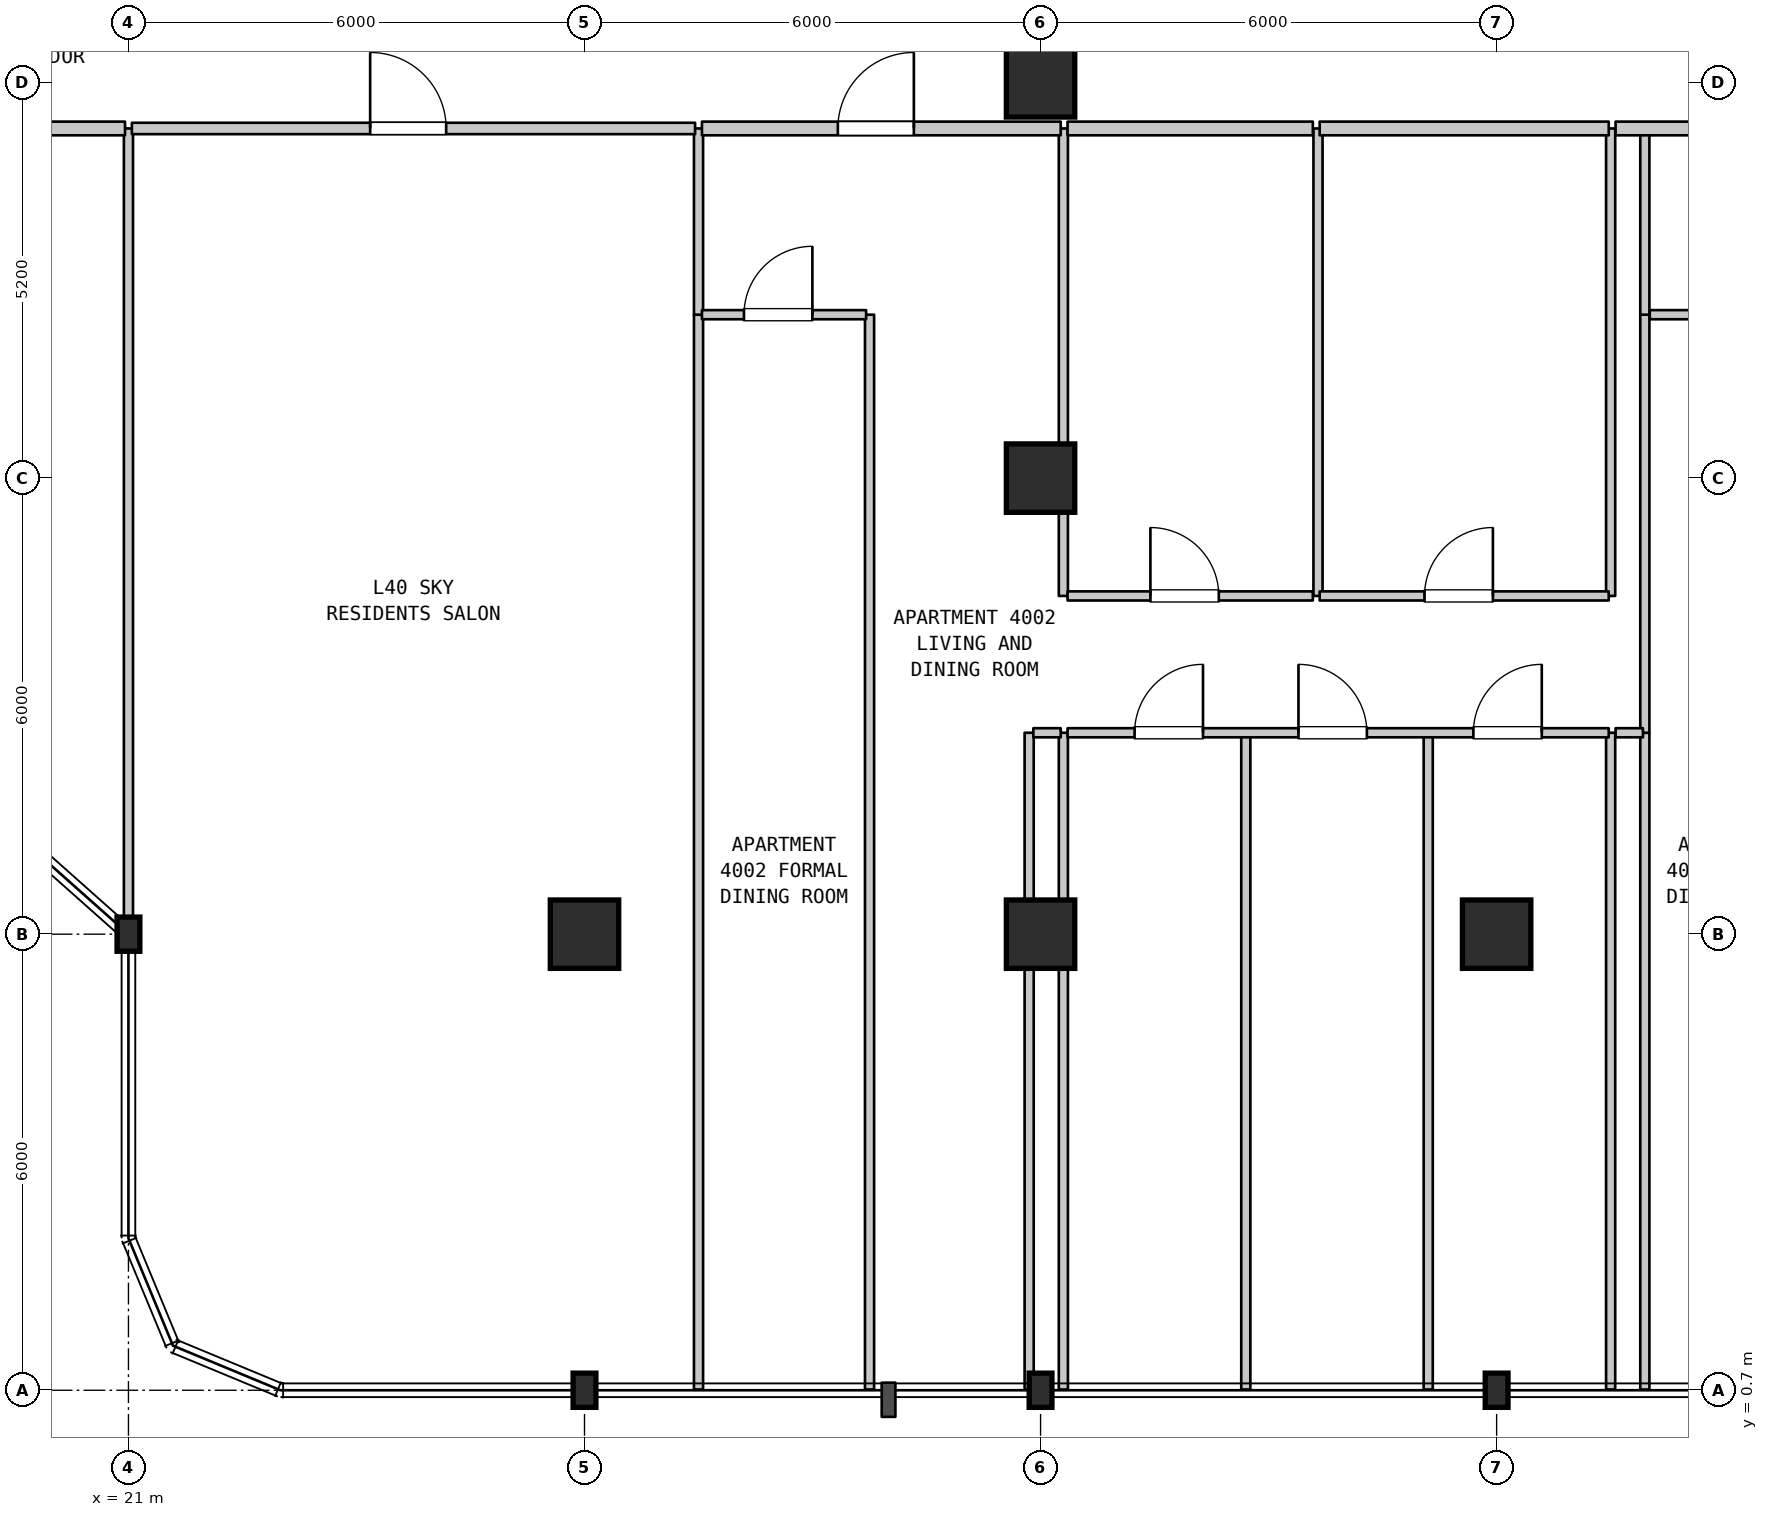
"""IFC4 building model, lengths in metres.
Left out: names, types, materials, properties, quantities, classifications, styles, units other than length and angle.
Written with IfcOpenShell. Run it as: python <this file> out.ifc"""

import sys

from ifc_helpers import new_model, si_unit, direction, frame, frame_2d, origin, origin_2d, place, context, subcontext, project, spatial, rectangle, i_section, extrude, element, fill, save


model = new_model("IFC4")
c1 = context("Model", 3, precision=1e-05, world=origin(), true_north=direction((0.0, 1.0)))
c2 = subcontext(c1, "Body", "Model", "MODEL_VIEW")
j1 = project(units=[si_unit("LENGTHUNIT", "METRE"), si_unit("PLANEANGLEUNIT", "RADIAN")], contexts=[c1])
p1 = place(None, origin())
s1 = spatial("IfcSite", under=j1, at=p1, CompositionType="ELEMENT")
p2 = place(p1, origin())
s2 = spatial("IfcBuilding", under=s1, at=p2, CompositionType="ELEMENT")
p3 = place(p2, frame((0.0, 0.0, 164.6)))
s3 = spatial("IfcBuildingStorey", under=s2, at=p3, CompositionType="ELEMENT", Elevation=164.6)
for number, where, z_axis, x_axis in (
    (1, (21.0, 6.7, 0.0), (0.0, 0.0, 1.0), (1.0, 0.0, 0.0)),
    (2, (27.0, 0.7, 0.0), (0.0, 0.0, 1.0), (1.0, 0.0, 0.0)),
):
    element("IfcColumn", number, at=place(p3, frame(where, z_axis=z_axis, x_axis=x_axis)), inside=s3, PredefinedType="COLUMN", context=c2, shape_type="SweptSolid", body=[
        extrude(i_section(OverallWidth=0.3, OverallDepth=0.45, WebThickness=0.014, FlangeThickness=0.026, FilletRadius=0.027, at=origin_2d()), origin(), (0.0, 0.0, 1.0), 4.5),
    ])
p4 = place(p3, frame((27.0, 6.7, 0.0), z_axis=(0.0, 0.0, 1.0), x_axis=(1.0, 0.0, 0.0)))
e3 = element("IfcColumn", 3, at=p4, inside=s3, PredefinedType="COLUMN", context=c2, shape_type="SweptSolid", body=[
    extrude(rectangle(XDim=0.9, YDim=0.9, at=origin_2d()), origin(), (0.0, 0.0, 1.0), 4.5),
])
p5 = place(p3, frame((33.0, 0.7, 0.0), z_axis=(0.0, 0.0, 1.0), x_axis=(1.0, 0.0, 0.0)))
e4 = element("IfcColumn", 4, at=p5, inside=s3, PredefinedType="COLUMN", context=c2, shape_type="SweptSolid", body=[
    extrude(i_section(OverallWidth=0.3, OverallDepth=0.45, WebThickness=0.014, FlangeThickness=0.026, FilletRadius=0.027, at=origin_2d()), origin(), (0.0, 0.0, 1.0), 4.5),
])
for number, where, z_axis, x_axis in (
    (5, (33.0, 6.7, 0.0), (0.0, 0.0, 1.0), (1.0, 0.0, 0.0)),
    (6, (33.0, 12.7, 0.0), (0.0, 0.0, 1.0), (1.0, 0.0, 0.0)),
    (7, (33.0, 17.9, 0.0), (0.0, 0.0, 1.0), (1.0, 0.0, 0.0)),
):
    element("IfcColumn", number, at=place(p3, frame(where, z_axis=z_axis, x_axis=x_axis)), inside=s3, PredefinedType="COLUMN", context=c2, shape_type="SweptSolid", body=[
        extrude(rectangle(XDim=0.9, YDim=0.9, at=origin_2d()), origin(), (0.0, 0.0, 1.0), 4.5),
    ])
p6 = place(p3, frame((39.0, 0.7, 0.0), z_axis=(0.0, 0.0, 1.0), x_axis=(1.0, 0.0, 0.0)))
e8 = element("IfcColumn", 8, at=p6, inside=s3, PredefinedType="COLUMN", context=c2, shape_type="SweptSolid", body=[
    extrude(i_section(OverallWidth=0.3, OverallDepth=0.45, WebThickness=0.014, FlangeThickness=0.026, FilletRadius=0.027, at=origin_2d()), origin(), (0.0, 0.0, 1.0), 4.5),
])
p7 = place(p3, frame((39.0, 6.7, 0.0), z_axis=(0.0, 0.0, 1.0), x_axis=(1.0, 0.0, 0.0)))
e9 = element("IfcColumn", 9, at=p7, inside=s3, PredefinedType="COLUMN", context=c2, shape_type="SweptSolid", body=[
    extrude(rectangle(XDim=0.9, YDim=0.9, at=origin_2d()), origin(), (0.0, 0.0, 1.0), 4.5),
])
p8 = place(p3, frame((21.0, 6.71, 0.0), z_axis=(0.0, 0.0, 1.0), x_axis=(0.0, 1.0, 0.0)))
e10 = element("IfcWall", 10, at=p8, inside=s3, PredefinedType="PARTITIONING", context=c2, shape_type="SweptSolid", body=[
    extrude(rectangle(XDim=10.59, YDim=0.12, at=frame_2d((5.295, 0.0))), origin(), (0.0, 0.0, 1.0), 4.19),
])
p9 = place(p3, frame((28.5, 0.71, 0.0), z_axis=(0.0, 0.0, 1.0), x_axis=(0.0, 1.0, 0.0)))
e11 = element("IfcWall", 11, at=p9, inside=s3, PredefinedType="PARTITIONING", context=c2, shape_type="SweptSolid", body=[
    extrude(rectangle(XDim=14.14, YDim=0.12, at=frame_2d((7.07, 0.0))), origin(), (0.0, 0.0, 1.0), 4.19),
])
p10 = place(p3, frame((28.5, 14.85, 0.0), z_axis=(0.0, 0.0, 1.0), x_axis=(0.0, 1.0, 0.0)))
e12 = element("IfcWall", 12, at=p10, inside=s3, PredefinedType="PARTITIONING", context=c2, shape_type="SweptSolid", body=[
    extrude(rectangle(XDim=2.45, YDim=0.12, at=frame_2d((1.225, 0.0))), origin(), (0.0, 0.0, 1.0), 4.19),
])
p11 = place(p3, frame((30.75, 0.71, 0.0), z_axis=(0.0, 0.0, 1.0), x_axis=(0.0, 1.0, 0.0)))
e13 = element("IfcWall", 13, at=p11, inside=s3, PredefinedType="PARTITIONING", context=c2, shape_type="SweptSolid", body=[
    extrude(rectangle(XDim=14.14, YDim=0.12, at=frame_2d((7.07, 0.0))), origin(), (0.0, 0.0, 1.0), 4.19),
])
for number, where, z_axis, x_axis in (
    (14, (32.85, 0.71, 0.0), (0.0, 0.0, 1.0), (0.0, 1.0, 0.0)),
    (15, (33.3, 0.71, 0.0), (0.0, 0.0, 1.0), (0.0, 1.0, 0.0)),
):
    element("IfcWall", number, at=place(p3, frame(where, z_axis=z_axis, x_axis=x_axis)), inside=s3, PredefinedType="PARTITIONING", context=c2, shape_type="SweptSolid", body=[
        extrude(rectangle(XDim=8.64, YDim=0.12, at=frame_2d((4.32, 0.0))), origin(), (0.0, 0.0, 1.0), 4.19),
    ])
p12 = place(p3, frame((33.3, 11.15, 0.0), z_axis=(0.0, 0.0, 1.0), x_axis=(0.0, 1.0, 0.0)))
e16 = element("IfcWall", 16, at=p12, inside=s3, PredefinedType="PARTITIONING", context=c2, shape_type="SweptSolid", body=[
    extrude(rectangle(XDim=6.15, YDim=0.12, at=frame_2d((3.075, 0.0))), origin(), (0.0, 0.0, 1.0), 4.19),
])
p13 = place(p3, frame((35.7, 0.71, 0.0), z_axis=(0.0, 0.0, 1.0), x_axis=(0.0, 1.0, 0.0)))
e17 = element("IfcWall", 17, at=p13, inside=s3, PredefinedType="PARTITIONING", context=c2, shape_type="SweptSolid", body=[
    extrude(rectangle(XDim=8.64, YDim=0.12, at=frame_2d((4.32, 0.0))), origin(), (0.0, 0.0, 1.0), 4.19),
])
p14 = place(p3, frame((36.65, 11.15, 0.0), z_axis=(0.0, 0.0, 1.0), x_axis=(0.0, 1.0, 0.0)))
e18 = element("IfcWall", 18, at=p14, inside=s3, PredefinedType="PARTITIONING", context=c2, shape_type="SweptSolid", body=[
    extrude(rectangle(XDim=6.15, YDim=0.12, at=frame_2d((3.075, 0.0))), origin(), (0.0, 0.0, 1.0), 4.19),
])
for number, where, z_axis, x_axis in (
    (19, (38.1, 0.71, 0.0), (0.0, 0.0, 1.0), (0.0, 1.0, 0.0)),
    (20, (40.5, 0.71, 0.0), (0.0, 0.0, 1.0), (0.0, 1.0, 0.0)),
):
    element("IfcWall", number, at=place(p3, frame(where, z_axis=z_axis, x_axis=x_axis)), inside=s3, PredefinedType="PARTITIONING", context=c2, shape_type="SweptSolid", body=[
        extrude(rectangle(XDim=8.64, YDim=0.12, at=frame_2d((4.32, 0.0))), origin(), (0.0, 0.0, 1.0), 4.19),
    ])
p15 = place(p3, frame((40.5, 11.15, 0.0), z_axis=(0.0, 0.0, 1.0), x_axis=(0.0, 1.0, 0.0)))
e21 = element("IfcWall", 21, at=p15, inside=s3, PredefinedType="PARTITIONING", context=c2, shape_type="SweptSolid", body=[
    extrude(rectangle(XDim=6.15, YDim=0.12, at=frame_2d((3.075, 0.0))), origin(), (0.0, 0.0, 1.0), 4.19),
])
p16 = place(p3, frame((40.95, 0.71, 0.0), z_axis=(0.0, 0.0, 1.0), x_axis=(0.0, 1.0, 0.0)))
e22 = element("IfcWall", 22, at=p16, inside=s3, PredefinedType="PARTITIONING", context=c2, shape_type="SweptSolid", body=[
    extrude(rectangle(XDim=8.64, YDim=0.12, at=frame_2d((4.32, 0.0))), origin(), (0.0, 0.0, 1.0), 4.19),
])
p17 = place(p3, frame((40.95, 9.35, 0.0), z_axis=(0.0, 0.0, 1.0), x_axis=(0.0, 1.0, 0.0)))
e23 = element("IfcWall", 23, at=p17, inside=s3, PredefinedType="PARTITIONING", context=c2, shape_type="SweptSolid", body=[
    extrude(rectangle(XDim=5.5, YDim=0.12, at=frame_2d((2.75, 0.0))), origin(), (0.0, 0.0, 1.0), 4.19),
])
p18 = place(p3, frame((40.95, 14.85, 0.0), z_axis=(0.0, 0.0, 1.0), x_axis=(0.0, 1.0, 0.0)))
e24 = element("IfcWall", 24, at=p18, inside=s3, PredefinedType="PARTITIONING", context=c2, shape_type="SweptSolid", body=[
    extrude(rectangle(XDim=2.45, YDim=0.12, at=frame_2d((1.225, 0.0))), origin(), (0.0, 0.0, 1.0), 4.19),
])
p19 = place(p3, frame((32.905, 9.35, 0.0), z_axis=(0.0, 0.0, 1.0), x_axis=(1.0, 0.0, 0.0)))
e25 = element("IfcWall", 25, at=p19, inside=s3, PredefinedType="PARTITIONING", context=c2, shape_type="SweptSolid", body=[
    extrude(rectangle(XDim=0.36, YDim=0.12, at=frame_2d((0.18, 0.0))), origin(), (0.0, 0.0, 1.0), 4.19),
])
p20 = place(p3, frame((33.355, 9.35, 0.0), z_axis=(0.0, 0.0, 1.0), x_axis=(1.0, 0.0, 0.0)))
e26 = element("IfcWall", 26, at=p20, inside=s3, PredefinedType="PARTITIONING", context=c2, shape_type="SweptSolid", body=[
    extrude(rectangle(XDim=7.12, YDim=0.12, at=frame_2d((3.56, 0.0))), origin(), (0.0, 0.0, 1.0), 4.19),
])
p21 = place(p20, frame((0.882, 0.0, 0.0)))
e27 = element("IfcOpeningElement", 27, at=p21, cuts=e26, PredefinedType="OPENING", context=c2, shape_type="SweptSolid", body=[
    extrude(rectangle(XDim=0.9, YDim=2.15, at=frame_2d((0.45, 1.075))), frame((0.0, 0.07, 0.0), z_axis=(0.0, -1.0, 0.0), x_axis=(1.0, 0.0, 0.0)), (0.0, 0.0, 1.0), 0.14),
])
p22 = place(p20, frame((3.038, 0.0, 0.0)))
e28 = element("IfcOpeningElement", 28, at=p22, cuts=e26, PredefinedType="OPENING", context=c2, shape_type="SweptSolid", body=[
    extrude(rectangle(XDim=0.9, YDim=2.15, at=frame_2d((0.45, 1.075))), frame((0.0, 0.07, 0.0), z_axis=(0.0, -1.0, 0.0), x_axis=(1.0, 0.0, 0.0)), (0.0, 0.0, 1.0), 0.14),
])
p23 = place(p20, frame((5.339, 0.0, 0.0)))
e29 = element("IfcOpeningElement", 29, at=p23, cuts=e26, PredefinedType="OPENING", context=c2, shape_type="SweptSolid", body=[
    extrude(rectangle(XDim=0.9, YDim=2.15, at=frame_2d((0.45, 1.075))), frame((0.0, 0.07, 0.0), z_axis=(0.0, -1.0, 0.0), x_axis=(1.0, 0.0, 0.0)), (0.0, 0.0, 1.0), 0.14),
])
p24 = place(p3, frame((40.565, 9.35, 0.0), z_axis=(0.0, 0.0, 1.0), x_axis=(1.0, 0.0, 0.0)))
e30 = element("IfcWall", 30, at=p24, inside=s3, PredefinedType="PARTITIONING", context=c2, shape_type="SweptSolid", body=[
    extrude(rectangle(XDim=0.36, YDim=0.12, at=frame_2d((0.18, 0.0))), origin(), (0.0, 0.0, 1.0), 4.19),
])
p25 = place(p3, frame((33.355, 11.15, 0.0), z_axis=(0.0, 0.0, 1.0), x_axis=(1.0, 0.0, 0.0)))
e31 = element("IfcWall", 31, at=p25, inside=s3, PredefinedType="PARTITIONING", context=c2, shape_type="SweptSolid", body=[
    extrude(rectangle(XDim=3.227, YDim=0.12, at=frame_2d((1.614, 0.0))), origin(), (0.0, 0.0, 1.0), 4.19),
])
p26 = place(p25, frame((1.09, 0.0, 0.0)))
e32 = element("IfcOpeningElement", 32, at=p26, cuts=e31, PredefinedType="OPENING", context=c2, shape_type="SweptSolid", body=[
    extrude(rectangle(XDim=0.9, YDim=2.15, at=frame_2d((0.45, 1.075))), frame((0.0, 0.07, 0.0), z_axis=(0.0, -1.0, 0.0), x_axis=(1.0, 0.0, 0.0)), (0.0, 0.0, 1.0), 0.14),
])
p27 = place(p3, frame((36.672, 11.15, 0.0), z_axis=(0.0, 0.0, 1.0), x_axis=(1.0, 0.0, 0.0)))
e33 = element("IfcWall", 33, at=p27, inside=s3, PredefinedType="PARTITIONING", context=c2, shape_type="SweptSolid", body=[
    extrude(rectangle(XDim=3.803, YDim=0.12, at=frame_2d((1.901, 0.0))), origin(), (0.0, 0.0, 1.0), 4.19),
])
p28 = place(p27, frame((1.379, 0.0, 0.0)))
e34 = element("IfcOpeningElement", 34, at=p28, cuts=e33, PredefinedType="OPENING", context=c2, shape_type="SweptSolid", body=[
    extrude(rectangle(XDim=0.9, YDim=2.1, at=frame_2d((0.45, 1.05))), frame((0.0, 0.07, 0.0), z_axis=(0.0, -1.0, 0.0), x_axis=(1.0, 0.0, 0.0)), (0.0, 0.0, 1.0), 0.14),
])
p29 = place(p3, frame((28.545, 14.85, 0.0), z_axis=(0.0, 0.0, 1.0), x_axis=(1.0, 0.0, 0.0)))
e35 = element("IfcWall", 35, at=p29, inside=s3, PredefinedType="PARTITIONING", context=c2, shape_type="SweptSolid", body=[
    extrude(rectangle(XDim=2.16, YDim=0.12, at=frame_2d((1.08, 0.0))), origin(), (0.0, 0.0, 1.0), 4.19),
])
p30 = place(p29, frame((0.553, 0.0, 0.0)))
e36 = element("IfcOpeningElement", 36, at=p30, cuts=e35, PredefinedType="OPENING", context=c2, shape_type="SweptSolid", body=[
    extrude(rectangle(XDim=0.9, YDim=2.15, at=frame_2d((0.45, 1.075))), frame((0.0, 0.07, 0.0), z_axis=(0.0, -1.0, 0.0), x_axis=(1.0, 0.0, 0.0)), (0.0, 0.0, 1.0), 0.14),
])
p31 = place(p3, frame((41.015, 14.85, 0.0), z_axis=(0.0, 0.0, 1.0), x_axis=(1.0, 0.0, 0.0)))
e37 = element("IfcWall", 37, at=p31, inside=s3, PredefinedType="PARTITIONING", context=c2, shape_type="SweptSolid", body=[
    extrude(rectangle(XDim=2.16, YDim=0.12, at=frame_2d((1.08, 0.0))), origin(), (0.0, 0.0, 1.0), 4.19),
])
p32 = place(p31, frame((0.553, 0.0, 0.0)))
e38 = element("IfcOpeningElement", 38, at=p32, cuts=e37, PredefinedType="OPENING", context=c2, shape_type="SweptSolid", body=[
    extrude(rectangle(XDim=0.9, YDim=2.15, at=frame_2d((0.45, 1.075))), frame((0.0, 0.07, 0.0), z_axis=(0.0, -1.0, 0.0), x_axis=(1.0, 0.0, 0.0)), (0.0, 0.0, 1.0), 0.14),
])
p33 = place(p3, frame((19.095, 17.3, 0.0), z_axis=(0.0, 0.0, 1.0), x_axis=(1.0, 0.0, 0.0)))
e39 = element("IfcWall", 39, at=p33, inside=s3, PredefinedType="STANDARD", context=c2, shape_type="SweptSolid", body=[
    extrude(rectangle(XDim=1.86, YDim=0.18, at=frame_2d((0.93, 0.0))), origin(), (0.0, 0.0, 1.0), 4.19),
])
p34 = place(p3, frame((21.045, 17.3, 0.0), z_axis=(0.0, 0.0, 1.0), x_axis=(1.0, 0.0, 0.0)))
e40 = element("IfcWall", 40, at=p34, inside=s3, PredefinedType="STANDARD", context=c2, shape_type="SweptSolid", body=[
    extrude(rectangle(XDim=7.41, YDim=0.15, at=frame_2d((3.705, 0.0))), origin(), (0.0, 0.0, 1.0), 4.19),
])
p35 = place(p34, frame((3.135, 0.0, 0.0)))
e41 = element("IfcOpeningElement", 41, at=p35, cuts=e40, PredefinedType="OPENING", context=c2, shape_type="SweptSolid", body=[
    extrude(rectangle(XDim=1.0, YDim=2.15, at=frame_2d((0.5, 1.075))), frame((0.0, 0.085, 0.0), z_axis=(0.0, -1.0, 0.0), x_axis=(1.0, 0.0, 0.0)), (0.0, 0.0, 1.0), 0.17),
])
p36 = place(p3, frame((28.545, 17.3, 0.0), z_axis=(0.0, 0.0, 1.0), x_axis=(1.0, 0.0, 0.0)))
e42 = element("IfcWall", 42, at=p36, inside=s3, PredefinedType="STANDARD", context=c2, shape_type="SweptSolid", body=[
    extrude(rectangle(XDim=4.72, YDim=0.18, at=frame_2d((2.36, 0.0))), origin(), (0.0, 0.0, 1.0), 4.19),
])
p37 = place(p36, frame((1.788, 0.0, 0.0)))
e43 = element("IfcOpeningElement", 43, at=p37, cuts=e42, PredefinedType="OPENING", context=c2, shape_type="SweptSolid", body=[
    extrude(rectangle(XDim=1.0, YDim=2.15, at=frame_2d((0.5, 1.075))), frame((0.0, 0.1, 0.0), z_axis=(0.0, -1.0, 0.0), x_axis=(1.0, 0.0, 0.0)), (0.0, 0.0, 1.0), 0.2),
])
p38 = place(p3, frame((33.355, 17.3, 0.0), z_axis=(0.0, 0.0, 1.0), x_axis=(1.0, 0.0, 0.0)))
e44 = element("IfcWall", 44, at=p38, inside=s3, PredefinedType="STANDARD", context=c2, shape_type="SweptSolid", body=[
    extrude(rectangle(XDim=3.227, YDim=0.18, at=frame_2d((1.614, 0.0))), origin(), (0.0, 0.0, 1.0), 4.19),
])
p39 = place(p3, frame((36.672, 17.3, 0.0), z_axis=(0.0, 0.0, 1.0), x_axis=(1.0, 0.0, 0.0)))
e45 = element("IfcWall", 45, at=p39, inside=s3, PredefinedType="STANDARD", context=c2, shape_type="SweptSolid", body=[
    extrude(rectangle(XDim=3.803, YDim=0.18, at=frame_2d((1.901, 0.0))), origin(), (0.0, 0.0, 1.0), 4.19),
])
p40 = place(p3, frame((40.565, 17.3, 0.0), z_axis=(0.0, 0.0, 1.0), x_axis=(1.0, 0.0, 0.0)))
e46 = element("IfcWall", 46, at=p40, inside=s3, PredefinedType="STANDARD", context=c2, shape_type="SweptSolid", body=[
    extrude(rectangle(XDim=5.545, YDim=0.18, at=frame_2d((2.772, 0.0))), origin(), (0.0, 0.0, 1.0), 4.19),
])
p41 = place(p40, frame((2.305, 0.0, 0.0)))
e47 = element("IfcOpeningElement", 47, at=p41, cuts=e46, PredefinedType="OPENING", context=c2, shape_type="SweptSolid", body=[
    extrude(rectangle(XDim=1.0, YDim=2.15, at=frame_2d((0.5, 1.075))), frame((0.0, 0.1, 0.0), z_axis=(0.0, -1.0, 0.0), x_axis=(1.0, 0.0, 0.0)), (0.0, 0.0, 1.0), 0.2),
])
p42 = place(p21, origin())
e48 = element("IfcDoor", 48, at=p42, inside=s3, OperationType="SINGLE_SWING_RIGHT", PredefinedType="DOOR", context=c2, shape_type="SweptSolid", body=[
    extrude(rectangle(XDim=0.9, YDim=2.15, at=frame_2d((0.45, 1.075))), frame((0.0, 0.025, 0.0), z_axis=(0.0, -1.0, 0.0), x_axis=(1.0, 0.0, 0.0)), (0.0, 0.0, 1.0), 0.05),
])
fill(e27, e48)
p43 = place(p22, origin())
e49 = element("IfcDoor", 49, at=p43, inside=s3, OperationType="SINGLE_SWING_LEFT", PredefinedType="DOOR", context=c2, shape_type="SweptSolid", body=[
    extrude(rectangle(XDim=0.9, YDim=2.15, at=frame_2d((0.45, 1.075))), frame((0.0, 0.025, 0.0), z_axis=(0.0, -1.0, 0.0), x_axis=(1.0, 0.0, 0.0)), (0.0, 0.0, 1.0), 0.05),
])
fill(e28, e49)
p44 = place(p23, origin())
e50 = element("IfcDoor", 50, at=p44, inside=s3, OperationType="SINGLE_SWING_RIGHT", PredefinedType="DOOR", context=c2, shape_type="SweptSolid", body=[
    extrude(rectangle(XDim=0.9, YDim=2.15, at=frame_2d((0.45, 1.075))), frame((0.0, 0.025, 0.0), z_axis=(0.0, -1.0, 0.0), x_axis=(1.0, 0.0, 0.0)), (0.0, 0.0, 1.0), 0.05),
])
fill(e29, e50)
p45 = place(p26, origin())
e51 = element("IfcDoor", 51, at=p45, inside=s3, OperationType="SINGLE_SWING_LEFT", PredefinedType="DOOR", context=c2, shape_type="SweptSolid", body=[
    extrude(rectangle(XDim=0.9, YDim=2.15, at=frame_2d((0.45, 1.075))), frame((0.0, 0.025, 0.0), z_axis=(0.0, -1.0, 0.0), x_axis=(1.0, 0.0, 0.0)), (0.0, 0.0, 1.0), 0.05),
])
fill(e32, e51)
p46 = place(p28, origin())
e52 = element("IfcDoor", 52, at=p46, inside=s3, OperationType="SINGLE_SWING_RIGHT", PredefinedType="DOOR", context=c2, shape_type="SweptSolid", body=[
    extrude(rectangle(XDim=0.9, YDim=2.1, at=frame_2d((0.45, 1.05))), frame((0.0, 0.025, 0.0), z_axis=(0.0, -1.0, 0.0), x_axis=(1.0, 0.0, 0.0)), (0.0, 0.0, 1.0), 0.05),
])
fill(e34, e52)
p47 = place(p30, origin())
e53 = element("IfcDoor", 53, at=p47, inside=s3, OperationType="SINGLE_SWING_RIGHT", PredefinedType="DOOR", context=c2, shape_type="SweptSolid", body=[
    extrude(rectangle(XDim=0.9, YDim=2.15, at=frame_2d((0.45, 1.075))), frame((0.0, 0.025, 0.0), z_axis=(0.0, -1.0, 0.0), x_axis=(1.0, 0.0, 0.0)), (0.0, 0.0, 1.0), 0.05),
])
fill(e36, e53)
p48 = place(p35, origin())
e54 = element("IfcDoor", 54, at=p48, inside=s3, OperationType="SINGLE_SWING_LEFT", PredefinedType="DOOR", context=c2, shape_type="SweptSolid", body=[
    extrude(rectangle(XDim=1.0, YDim=2.15, at=frame_2d((0.5, 1.075))), frame((0.0, 0.025, 0.0), z_axis=(0.0, -1.0, 0.0), x_axis=(1.0, 0.0, 0.0)), (0.0, 0.0, 1.0), 0.05),
])
fill(e41, e54)
p49 = place(p37, origin())
e55 = element("IfcDoor", 55, at=p49, inside=s3, OperationType="SINGLE_SWING_RIGHT", PredefinedType="DOOR", context=c2, shape_type="SweptSolid", body=[
    extrude(rectangle(XDim=1.0, YDim=2.15, at=frame_2d((0.5, 1.075))), frame((0.0, 0.025, 0.0), z_axis=(0.0, -1.0, 0.0), x_axis=(1.0, 0.0, 0.0)), (0.0, 0.0, 1.0), 0.05),
])
fill(e43, e55)
save(model, sys.argv[1])
